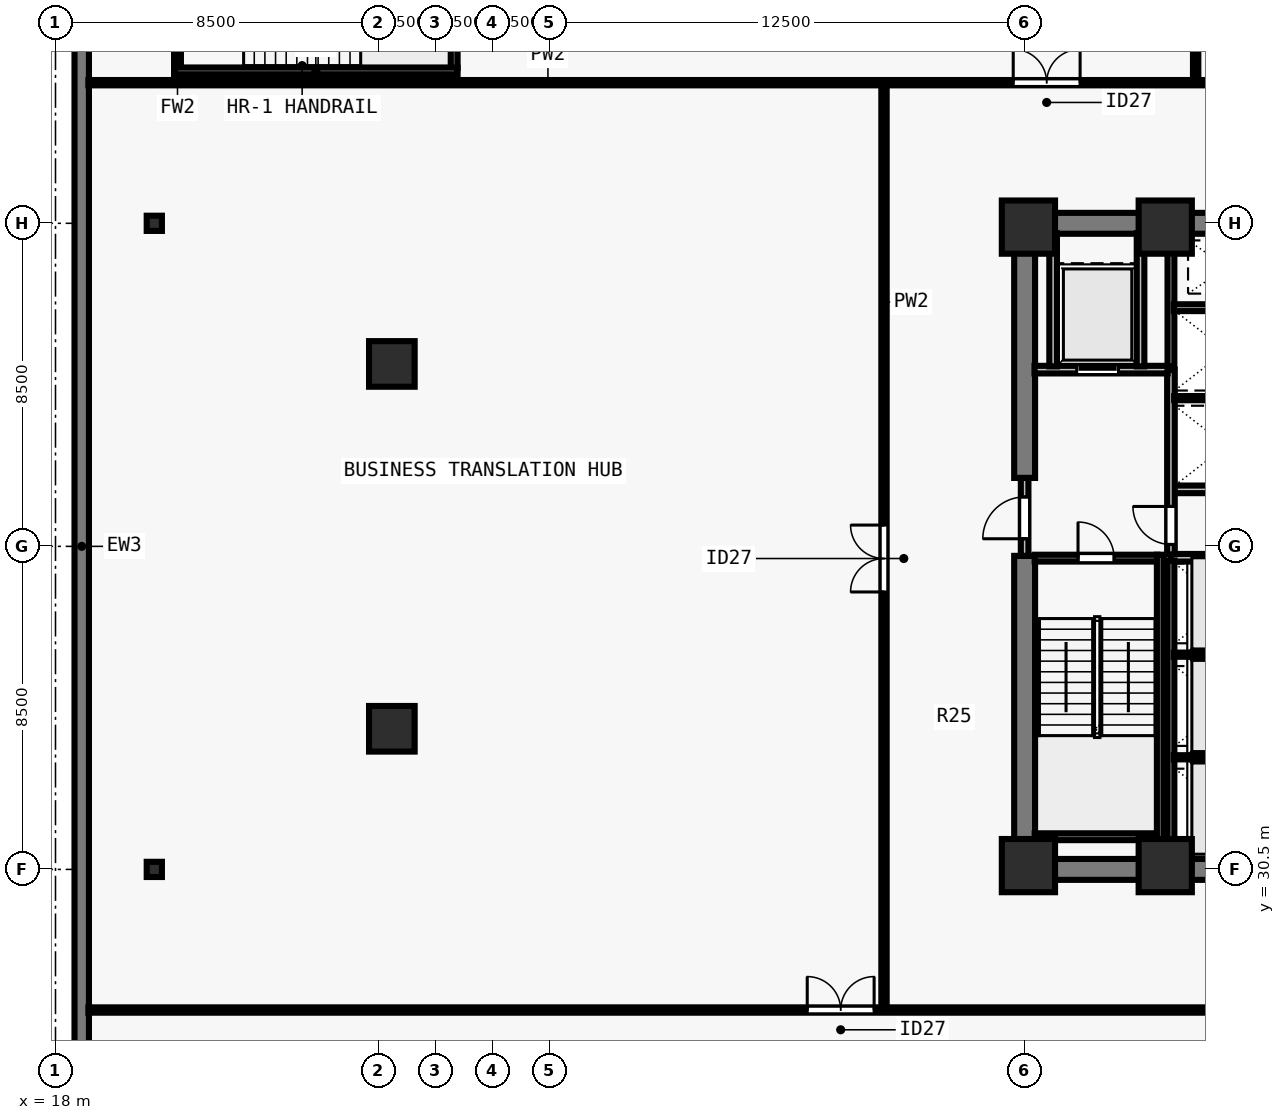
"""IFC4 building model, lengths in metres.
Left out: names, types, materials, properties, quantities, classifications, styles, units other than length and angle.
Written with IfcOpenShell. Run it as: python <this file> out.ifc"""

import sys

from ifc_helpers import new_model, si_unit, direction, frame, frame_2d, origin, origin_2d, place, context, subcontext, project, spatial, rectangle, i_section, extrude, element, fill, save


model = new_model("IFC4")
c1 = context("Model", 3, precision=1e-05, world=origin(), true_north=direction((0.0, 1.0)))
c2 = subcontext(c1, "Body", "Model", "MODEL_VIEW")
j1 = project(units=[si_unit("LENGTHUNIT", "METRE"), si_unit("PLANEANGLEUNIT", "RADIAN")], contexts=[c1])
p1 = place(None, origin())
s1 = spatial("IfcSite", under=j1, at=p1, CompositionType="ELEMENT")
p2 = place(p1, origin())
s2 = spatial("IfcBuilding", under=s1, at=p2, CompositionType="ELEMENT")
p3 = place(p2, frame((0.0, 0.0, 14.5)))
s3 = spatial("IfcBuildingStorey", under=s2, at=p3, CompositionType="ELEMENT", Elevation=14.5)
for number, where, z_axis, x_axis in (
    (1, (43.6, 30.6, 0.0), (0.0, 0.0, 1.0), (1.0, 0.0, 0.0)),
    (2, (47.2, 30.6, 0.0), (0.0, 0.0, 1.0), (1.0, 0.0, 0.0)),
    (3, (43.6, 47.4, 0.0), (0.0, 0.0, 1.0), (1.0, 0.0, 0.0)),
    (4, (47.2, 47.4, 0.0), (0.0, 0.0, 1.0), (1.0, 0.0, 0.0)),
):
    element("IfcColumn", number, at=place(p3, frame(where, z_axis=z_axis, x_axis=x_axis)), inside=s3, PredefinedType="COLUMN", context=c2, shape_type="SweptSolid", body=[
        extrude(rectangle(XDim=1.4, YDim=1.4, at=origin_2d()), origin(), (0.0, 0.0, 1.0), 4.5),
    ])
for number, where, z_axis, x_axis in (
    (5, (26.85, 43.8, 0.0), (0.0, 0.0, 1.0), (1.0, 0.0, 0.0)),
    (6, (26.85, 34.2, 0.0), (0.0, 0.0, 1.0), (1.0, 0.0, 0.0)),
):
    element("IfcColumn", number, at=place(p3, frame(where, z_axis=z_axis, x_axis=x_axis)), inside=s3, PredefinedType="COLUMN", context=c2, shape_type="SweptSolid", body=[
        extrude(rectangle(XDim=1.2, YDim=1.2, at=origin_2d()), origin(), (0.0, 0.0, 1.0), 4.5),
    ])
for number, where, z_axis, x_axis in (
    (7, (20.6, 30.5, 0.0), (0.0, 0.0, 1.0), (1.0, 0.0, 0.0)),
    (8, (20.6, 47.5, 0.0), (0.0, 0.0, 1.0), (1.0, 0.0, 0.0)),
):
    element("IfcColumn", number, at=place(p3, frame(where, z_axis=z_axis, x_axis=x_axis)), inside=s3, PredefinedType="COLUMN", context=c2, shape_type="SweptSolid", body=[
        extrude(i_section(OverallWidth=0.4, OverallDepth=0.4, WebThickness=0.028, FlangeThickness=0.045, at=origin_2d()), origin(), (0.0, 0.0, 1.0), 4.5),
    ])
p4 = place(p3, frame((18.69, 12.365, 0.0), z_axis=(0.0, 0.0, 1.0), x_axis=(0.0, 1.0, 0.0)))
e9 = element("IfcWall", 9, at=p4, inside=s3, PredefinedType="SOLIDWALL", context=c2, shape_type="SweptSolid", body=[
    extrude(rectangle(XDim=53.27, YDim=0.38, at=frame_2d((26.635, 0.0))), origin(), (0.0, 0.0, 1.0), 4.15),
])
for number, where, z_axis, x_axis in (
    (10, (43.225, 30.5, 0.0), (0.0, 0.0, 1.0), (1.0, 0.0, 0.0)),
    (11, (43.225, 47.5, 0.0), (0.0, 0.0, 1.0), (1.0, 0.0, 0.0)),
):
    element("IfcWall", number, at=place(p3, frame(where, z_axis=z_axis, x_axis=x_axis)), inside=s3, PredefinedType="SHEAR", context=c2, shape_type="SweptSolid", body=[
        extrude(rectangle(XDim=17.55, YDim=0.55, at=frame_2d((8.775, 0.0))), origin(), (0.0, 0.0, 1.0), 4.15),
    ])
p5 = place(p3, frame((43.5, 30.765, 0.0), z_axis=(0.0, 0.0, 1.0), x_axis=(0.0, 1.0, 0.0)))
e12 = element("IfcWall", 12, at=p5, inside=s3, PredefinedType="SHEAR", context=c2, shape_type="SweptSolid", body=[
    extrude(rectangle(XDim=7.985, YDim=0.55, at=frame_2d((3.993, 0.0))), origin(), (0.0, 0.0, 1.0), 4.15),
])
p6 = place(p3, frame((43.5, 40.8, 0.0), z_axis=(0.0, 0.0, 1.0), x_axis=(0.0, 1.0, 0.0)))
e13 = element("IfcWall", 13, at=p6, inside=s3, PredefinedType="SHEAR", context=c2, shape_type="SweptSolid", body=[
    extrude(rectangle(XDim=6.435, YDim=0.55, at=frame_2d((3.218, 0.0))), origin(), (0.0, 0.0, 1.0), 4.15),
])
for number, where, z_axis, x_axis in (
    (14, (47.35, 38.7, 0.0), (0.0, 0.0, 1.0), (1.0, 0.0, 0.0)),
    (15, (47.35, 40.5, 0.0), (0.0, 0.0, 1.0), (1.0, 0.0, 0.0)),
):
    element("IfcWall", number, at=place(p3, frame(where, z_axis=z_axis, x_axis=x_axis)), inside=s3, PredefinedType="SOLIDWALL", context=c2, shape_type="SweptSolid", body=[
        extrude(rectangle(XDim=2.95, YDim=0.2, at=frame_2d((1.475, 0.0))), origin(), (0.0, 0.0, 1.0), 4.15),
    ])
p7 = place(p3, frame((43.5, 38.75, 0.0), z_axis=(0.0, 0.0, 1.0), x_axis=(0.0, 1.0, 0.0)))
e16 = element("IfcWall", 16, at=p7, inside=s3, PredefinedType="SOLIDWALL", context=c2, shape_type="SweptSolid", body=[
    extrude(rectangle(XDim=2.05, YDim=0.2, at=frame_2d((1.025, 0.0))), origin(), (0.0, 0.0, 1.0), 4.15),
])
p8 = place(p7, frame((0.45, 0.0, 0.0)))
e17 = element("IfcOpeningElement", 17, at=p8, cuts=e16, PredefinedType="OPENING", context=c2, shape_type="SweptSolid", body=[
    extrude(rectangle(XDim=1.1, YDim=2.15, at=frame_2d((0.55, 1.075))), frame((0.0, 0.11, 0.0), z_axis=(0.0, -1.0, 0.0), x_axis=(1.0, 0.0, 0.0)), (0.0, 0.0, 1.0), 0.22),
])
p9 = place(p3, frame((47.35, 38.785, 0.0), z_axis=(0.0, 0.0, 1.0), x_axis=(0.0, 1.0, 0.0)))
e18 = element("IfcWall", 18, at=p9, inside=s3, PredefinedType="SOLIDWALL", context=c2, shape_type="SweptSolid", body=[
    extrude(rectangle(XDim=4.865, YDim=0.2, at=frame_2d((2.433, 0.0))), origin(), (0.0, 0.0, 1.0), 4.15),
])
p10 = place(p9, frame((0.265, 0.0, 0.0)))
e19 = element("IfcOpeningElement", 19, at=p10, cuts=e18, PredefinedType="OPENING", context=c2, shape_type="SweptSolid", body=[
    extrude(rectangle(XDim=1.0, YDim=2.15, at=frame_2d((0.5, 1.075))), frame((0.0, 0.11, 0.0), z_axis=(0.0, -1.0, 0.0), x_axis=(1.0, 0.0, 0.0)), (0.0, 0.0, 1.0), 0.22),
])
p11 = place(p3, frame((43.76, 43.65, 0.0), z_axis=(0.0, 0.0, 1.0), x_axis=(1.0, 0.0, 0.0)))
e20 = element("IfcWall", 20, at=p11, inside=s3, PredefinedType="SOLIDWALL", context=c2, shape_type="SweptSolid", body=[
    extrude(rectangle(XDim=3.505, YDim=0.2, at=frame_2d((1.752, 0.0))), origin(), (0.0, 0.0, 1.0), 4.15),
])
p12 = place(p11, frame((1.11, 0.0, 0.0)))
e21 = element("IfcOpeningElement", 21, at=p12, cuts=e20, PredefinedType="OPENING", context=c2, shape_type="SweptSolid", body=[
    extrude(rectangle(XDim=1.1, YDim=2.2, at=frame_2d((0.55, 1.1))), frame((0.0, 0.11, 0.0), z_axis=(0.0, -1.0, 0.0), x_axis=(1.0, 0.0, 0.0)), (0.0, 0.0, 1.0), 0.22),
])
for number, where, z_axis, x_axis in (
    (22, (46.55, 43.735, 0.0), (0.0, 0.0, 1.0), (0.0, 1.0, 0.0)),
    (23, (44.25, 43.735, 0.0), (0.0, 0.0, 1.0), (0.0, 1.0, 0.0)),
):
    element("IfcWall", number, at=place(p3, frame(where, z_axis=z_axis, x_axis=x_axis)), inside=s3, PredefinedType="SOLIDWALL", context=c2, shape_type="SweptSolid", body=[
        extrude(rectangle(XDim=3.505, YDim=0.2, at=frame_2d((1.752, 0.0))), origin(), (0.0, 0.0, 1.0), 4.15),
    ])
p13 = place(p3, frame((47.35, 30.76, 0.0), z_axis=(0.0, 0.0, 1.0), x_axis=(0.0, 1.0, 0.0)))
e24 = element("IfcWall", 24, at=p13, inside=s3, PredefinedType="SOLIDWALL", context=c2, shape_type="SweptSolid", body=[
    extrude(rectangle(XDim=7.855, YDim=0.18, at=frame_2d((3.927, 0.0))), origin(), (0.0, 0.0, 1.0), 4.15),
])
for number, where, z_axis, x_axis in (
    (25, (47.425, 33.45, 0.0), (0.0, 0.0, 1.0), (1.0, 0.0, 0.0)),
    (26, (47.425, 36.15, 0.0), (0.0, 0.0, 1.0), (1.0, 0.0, 0.0)),
):
    element("IfcWall", number, at=place(p3, frame(where, z_axis=z_axis, x_axis=x_axis)), inside=s3, PredefinedType="PARTITIONING", context=c2, shape_type="SweptSolid", body=[
        extrude(rectangle(XDim=2.79, YDim=0.11, at=frame_2d((1.395, 0.0))), origin(), (0.0, 0.0, 1.0), 4.15),
    ])
p14 = place(p3, frame((47.35, 43.735, 0.0), z_axis=(0.0, 0.0, 1.0), x_axis=(0.0, 1.0, 0.0)))
e27 = element("IfcWall", 27, at=p14, inside=s3, PredefinedType="SOLIDWALL", context=c2, shape_type="SweptSolid", body=[
    extrude(rectangle(XDim=3.505, YDim=0.18, at=frame_2d((1.752, 0.0))), origin(), (0.0, 0.0, 1.0), 4.15),
])
p15 = place(p3, frame((47.435, 42.9, 0.0), z_axis=(0.0, 0.0, 1.0), x_axis=(1.0, 0.0, 0.0)))
e28 = element("IfcWall", 28, at=p15, inside=s3, PredefinedType="PARTITIONING", context=c2, shape_type="SweptSolid", body=[
    extrude(rectangle(XDim=2.78, YDim=0.11, at=frame_2d((1.39, 0.0))), origin(), (0.0, 0.0, 1.0), 4.15),
])
p16 = place(p3, frame((47.425, 45.28, 0.0), z_axis=(0.0, 0.0, 1.0), x_axis=(1.0, 0.0, 0.0)))
e29 = element("IfcWall", 29, at=p16, inside=s3, PredefinedType="SOLIDWALL", context=c2, shape_type="SweptSolid", body=[
    extrude(rectangle(XDim=2.79, YDim=0.18, at=frame_2d((1.395, 0.0))), origin(), (0.0, 0.0, 1.0), 4.15),
])
p17 = place(p3, frame((18.865, 26.8, 0.0), z_axis=(0.0, 0.0, 1.0), x_axis=(1.0, 0.0, 0.0)))
e30 = element("IfcWall", 30, at=p17, inside=s3, PredefinedType="PARTITIONING", context=c2, shape_type="SweptSolid", body=[
    extrude(rectangle(XDim=66.27, YDim=0.14, at=frame_2d((33.135, 0.0))), origin(), (0.0, 0.0, 1.0), 3.668),
])
p18 = place(p17, frame((18.915, 0.0, 0.0)))
e31 = element("IfcOpeningElement", 31, at=p18, cuts=e30, PredefinedType="OPENING", context=c2, shape_type="SweptSolid", body=[
    extrude(rectangle(XDim=1.76, YDim=2.2, at=frame_2d((0.88, 1.1))), frame((0.0, 0.08, 0.0), z_axis=(0.0, -1.0, 0.0), x_axis=(1.0, 0.0, 0.0)), (0.0, 0.0, 1.0), 0.16),
])
p19 = place(p17, frame((41.135, 0.0, 0.0)))
e32 = element("IfcOpeningElement", 32, at=p19, cuts=e30, PredefinedType="OPENING", context=c2, shape_type="SweptSolid", body=[
    extrude(rectangle(XDim=1.76, YDim=2.2, at=frame_2d((0.88, 1.1))), frame((0.0, 0.08, 0.0), z_axis=(0.0, -1.0, 0.0), x_axis=(1.0, 0.0, 0.0)), (0.0, 0.0, 1.0), 0.16),
])
p20 = place(p3, frame((18.865, 51.2, 0.0), z_axis=(0.0, 0.0, 1.0), x_axis=(1.0, 0.0, 0.0)))
e33 = element("IfcWall", 33, at=p20, inside=s3, PredefinedType="PARTITIONING", context=c2, shape_type="SweptSolid", body=[
    extrude(rectangle(XDim=66.27, YDim=0.14, at=frame_2d((33.135, 0.0))), origin(), (0.0, 0.0, 1.0), 3.668),
])
p21 = place(p20, frame((24.335, 0.0, 0.0)))
e34 = element("IfcOpeningElement", 34, at=p21, cuts=e33, PredefinedType="OPENING", context=c2, shape_type="SweptSolid", body=[
    extrude(rectangle(XDim=1.76, YDim=2.2, at=frame_2d((0.88, 1.1))), frame((0.0, 0.08, 0.0), z_axis=(0.0, -1.0, 0.0), x_axis=(1.0, 0.0, 0.0)), (0.0, 0.0, 1.0), 0.16),
])
p22 = place(p20, frame((37.135, 0.0, 0.0)))
e35 = element("IfcOpeningElement", 35, at=p22, cuts=e33, PredefinedType="OPENING", context=c2, shape_type="SweptSolid", body=[
    extrude(rectangle(XDim=1.76, YDim=2.2, at=frame_2d((0.88, 1.1))), frame((0.0, 0.08, 0.0), z_axis=(0.0, -1.0, 0.0), x_axis=(1.0, 0.0, 0.0)), (0.0, 0.0, 1.0), 0.16),
])
p23 = place(p20, frame((51.135, 0.0, 0.0)))
e36 = element("IfcOpeningElement", 36, at=p23, cuts=e33, PredefinedType="OPENING", context=c2, shape_type="SweptSolid", body=[
    extrude(rectangle(XDim=0.95, YDim=2.1, at=frame_2d((0.475, 1.05))), frame((0.0, 0.08, 0.0), z_axis=(0.0, -1.0, 0.0), x_axis=(1.0, 0.0, 0.0)), (0.0, 0.0, 1.0), 0.16),
])
p24 = place(p20, frame((55.335, 0.0, 0.0)))
e37 = element("IfcOpeningElement", 37, at=p24, cuts=e33, PredefinedType="OPENING", context=c2, shape_type="SweptSolid", body=[
    extrude(rectangle(XDim=1.76, YDim=2.2, at=frame_2d((0.88, 1.1))), frame((0.0, 0.08, 0.0), z_axis=(0.0, -1.0, 0.0), x_axis=(1.0, 0.0, 0.0)), (0.0, 0.0, 1.0), 0.16),
])
p25 = place(p3, frame((39.8, 26.855, 0.0), z_axis=(0.0, 0.0, 1.0), x_axis=(0.0, 1.0, 0.0)))
e38 = element("IfcWall", 38, at=p25, inside=s3, PredefinedType="PARTITIONING", context=c2, shape_type="SweptSolid", body=[
    extrude(rectangle(XDim=24.29, YDim=0.14, at=frame_2d((12.145, 0.0))), origin(), (0.0, 0.0, 1.0), 4.15),
])
p26 = place(p25, frame((10.945, 0.0, 0.0)))
e39 = element("IfcOpeningElement", 39, at=p26, cuts=e38, PredefinedType="OPENING", context=c2, shape_type="SweptSolid", body=[
    extrude(rectangle(XDim=1.76, YDim=2.2, at=frame_2d((0.88, 1.1))), frame((0.0, 0.08, 0.0), z_axis=(0.0, -1.0, 0.0), x_axis=(1.0, 0.0, 0.0)), (0.0, 0.0, 1.0), 0.16),
])
p27 = place(p3, frame((48.0, 51.3, 0.0), z_axis=(0.0, 0.0, 1.0), x_axis=(0.0, 1.0, 0.0)))
e40 = element("IfcWall", 40, at=p27, inside=s3, PredefinedType="PARTITIONING", context=c2, shape_type="SweptSolid", body=[
    extrude(rectangle(XDim=14.335, YDim=0.14, at=frame_2d((7.167, 0.0))), origin(), (0.0, 0.0, 1.0), 4.15),
])
p28 = place(p3, frame((43.765, 38.69, 0.0), z_axis=(0.0, 0.0, 1.0), x_axis=(1.0, 0.0, 0.0)))
e41 = element("IfcWall", 41, at=p28, inside=s3, PredefinedType="SOLIDWALL", context=c2, shape_type="SweptSolid", body=[
    extrude(rectangle(XDim=3.23, YDim=0.18, at=frame_2d((1.615, 0.0))), origin(), (0.0, 0.0, 1.0), 4.15),
])
p29 = place(p28, frame((1.14, 0.0, 0.0)))
e42 = element("IfcOpeningElement", 42, at=p29, cuts=e41, PredefinedType="OPENING", context=c2, shape_type="SweptSolid", body=[
    extrude(rectangle(XDim=0.95, YDim=2.15, at=frame_2d((0.475, 1.075))), frame((0.0, 0.1, 0.0), z_axis=(0.0, -1.0, 0.0), x_axis=(1.0, 0.0, 0.0)), (0.0, 0.0, 1.0), 0.2),
])
p30 = place(p3, frame((43.765, 31.36, 0.0), z_axis=(0.0, 0.0, 1.0), x_axis=(1.0, 0.0, 0.0)))
e43 = element("IfcWall", 43, at=p30, inside=s3, PredefinedType="SOLIDWALL", context=c2, shape_type="SweptSolid", body=[
    extrude(rectangle(XDim=3.23, YDim=0.18, at=frame_2d((1.615, 0.0))), origin(), (0.0, 0.0, 1.0), 4.15),
])
p31 = place(p3, frame((47.07, 38.78, 0.0), z_axis=(0.0, 0.0, 1.0), x_axis=(0.0, -1.0, 0.0)))
e44 = element("IfcWall", 44, at=p31, inside=s3, PredefinedType="SOLIDWALL", context=c2, shape_type="SweptSolid", body=[
    extrude(rectangle(XDim=8.017, YDim=0.18, at=frame_2d((4.009, 0.0))), origin(), (0.0, 0.0, 1.0), 4.15),
])
p32 = place(p3, frame((21.21, 51.585, 0.0), z_axis=(0.0, 0.0, 1.0), x_axis=(0.0, 1.0, 0.0)))
e45 = element("IfcWall", 45, at=p32, inside=s3, PredefinedType="SOLIDWALL", context=c2, shape_type="SweptSolid", body=[
    extrude(rectangle(XDim=3.47, YDim=0.18, at=frame_2d((1.735, 0.0))), origin(), (0.0, 0.0, 1.0), 4.15),
])
p33 = place(p32, frame((1.26, 0.0, 0.0)))
e46 = element("IfcOpeningElement", 46, at=p33, cuts=e45, PredefinedType="OPENING", context=c2, shape_type="SweptSolid", body=[
    extrude(rectangle(XDim=0.95, YDim=2.15, at=frame_2d((0.475, 1.075))), frame((0.0, 0.1, 0.0), z_axis=(0.0, -1.0, 0.0), x_axis=(1.0, 0.0, 0.0)), (0.0, 0.0, 1.0), 0.2),
])
p34 = place(p3, frame((28.49, 51.585, 0.0), z_axis=(0.0, 0.0, 1.0), x_axis=(0.0, 1.0, 0.0)))
e47 = element("IfcWall", 47, at=p34, inside=s3, PredefinedType="SOLIDWALL", context=c2, shape_type="SweptSolid", body=[
    extrude(rectangle(XDim=3.47, YDim=0.18, at=frame_2d((1.735, 0.0))), origin(), (0.0, 0.0, 1.0), 4.15),
])
p35 = place(p3, frame((21.12, 51.51, 0.0), z_axis=(0.0, 0.0, 1.0), x_axis=(1.0, 0.0, 0.0)))
e48 = element("IfcWall", 48, at=p35, inside=s3, PredefinedType="SOLIDWALL", context=c2, shape_type="SweptSolid", body=[
    extrude(rectangle(XDim=7.46, YDim=0.18, at=frame_2d((3.73, 0.0))), origin(), (0.0, 0.0, 1.0), 4.15),
])
p36 = place(p8, origin())
e49 = element("IfcDoor", 49, at=p36, inside=s3, OperationType="SINGLE_SWING_LEFT", PredefinedType="DOOR", context=c2, shape_type="SweptSolid", body=[
    extrude(rectangle(XDim=1.1, YDim=2.15, at=frame_2d((0.55, 1.075))), frame((0.0, 0.025, 0.0), z_axis=(0.0, -1.0, 0.0), x_axis=(1.0, 0.0, 0.0)), (0.0, 0.0, 1.0), 0.05),
])
fill(e17, e49)
p37 = place(p10, origin())
e50 = element("IfcDoor", 50, at=p37, inside=s3, OperationType="SINGLE_SWING_RIGHT", PredefinedType="DOOR", context=c2, shape_type="SweptSolid", body=[
    extrude(rectangle(XDim=1.0, YDim=2.15, at=frame_2d((0.5, 1.075))), frame((0.0, 0.025, 0.0), z_axis=(0.0, -1.0, 0.0), x_axis=(1.0, 0.0, 0.0)), (0.0, 0.0, 1.0), 0.05),
])
fill(e19, e50)
p38 = place(p12, origin())
e51 = element("IfcDoor", 51, at=p38, inside=s3, OperationType="SLIDING_TO_LEFT", PredefinedType="DOOR", context=c2, shape_type="SweptSolid", body=[
    extrude(rectangle(XDim=1.1, YDim=2.2, at=frame_2d((0.55, 1.1))), frame((0.0, 0.025, 0.0), z_axis=(0.0, -1.0, 0.0), x_axis=(1.0, 0.0, 0.0)), (0.0, 0.0, 1.0), 0.05),
])
fill(e21, e51)
p39 = place(p18, origin())
e52 = element("IfcDoor", 52, at=p39, inside=s3, OperationType="DOUBLE_DOOR_SINGLE_SWING", PredefinedType="DOOR", context=c2, shape_type="SweptSolid", body=[
    extrude(rectangle(XDim=1.76, YDim=2.2, at=frame_2d((0.88, 1.1))), frame((0.0, 0.025, 0.0), z_axis=(0.0, -1.0, 0.0), x_axis=(1.0, 0.0, 0.0)), (0.0, 0.0, 1.0), 0.05),
])
fill(e31, e52)
p40 = place(p21, origin())
e53 = element("IfcDoor", 53, at=p40, inside=s3, OperationType="DOUBLE_DOOR_SINGLE_SWING", PredefinedType="DOOR", context=c2, shape_type="SweptSolid", body=[
    extrude(rectangle(XDim=1.76, YDim=2.2, at=frame_2d((0.88, 1.1))), frame((0.0, 0.025, 0.0), z_axis=(0.0, -1.0, 0.0), x_axis=(1.0, 0.0, 0.0)), (0.0, 0.0, 1.0), 0.05),
])
fill(e34, e53)
p41 = place(p26, origin())
e54 = element("IfcDoor", 54, at=p41, inside=s3, OperationType="DOUBLE_DOOR_SINGLE_SWING", PredefinedType="DOOR", context=c2, shape_type="SweptSolid", body=[
    extrude(rectangle(XDim=1.76, YDim=2.2, at=frame_2d((0.88, 1.1))), frame((0.0, 0.025, 0.0), z_axis=(0.0, -1.0, 0.0), x_axis=(1.0, 0.0, 0.0)), (0.0, 0.0, 1.0), 0.05),
])
fill(e39, e54)
p42 = place(p29, origin())
e55 = element("IfcDoor", 55, at=p42, inside=s3, OperationType="SINGLE_SWING_LEFT", PredefinedType="DOOR", context=c2, shape_type="SweptSolid", body=[
    extrude(rectangle(XDim=0.95, YDim=2.15, at=frame_2d((0.475, 1.075))), frame((0.0, 0.025, 0.0), z_axis=(0.0, -1.0, 0.0), x_axis=(1.0, 0.0, 0.0)), (0.0, 0.0, 1.0), 0.05),
])
fill(e42, e55)
save(model, sys.argv[1])
